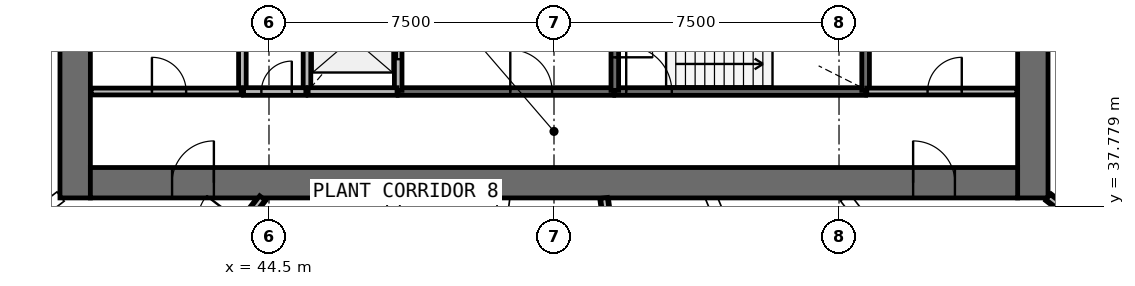
"""IFC4 building model, lengths in metres.
Left out: names, types, materials, properties, quantities, classifications, styles, units other than length and angle.
Written with IfcOpenShell. Run it as: python <this file> out.ifc"""

import sys

from ifc_helpers import new_model, si_unit, direction, frame, frame_2d, origin, place, context, subcontext, project, spatial, rectangle, extrude, source, transform, mapped, element, fill, save


model = new_model("IFC4")
c1 = context("Model", 3, precision=1e-05, world=origin(), true_north=direction((0.0, 1.0)))
c2 = subcontext(c1, "Body", "Model", "MODEL_VIEW")
j1 = project(units=[si_unit("LENGTHUNIT", "METRE"), si_unit("PLANEANGLEUNIT", "RADIAN")], contexts=[c1])
p1 = place(None, origin())
s1 = spatial("IfcSite", under=j1, at=p1, CompositionType="ELEMENT")
p2 = place(p1, origin())
s2 = spatial("IfcBuilding", under=s1, at=p2, CompositionType="ELEMENT")
p3 = place(p2, frame((0.0, 0.0, 129.0)))
s3 = spatial("IfcBuildingStorey", under=s2, at=p3, CompositionType="ELEMENT", Elevation=129.0)
p4 = place(p3, frame((64.6, 38.0, 0.0), z_axis=(0.0, 0.0, 1.0), x_axis=(0.0, 1.0, 0.0)))
e1 = element("IfcWall", 1, at=p4, inside=s3, PredefinedType="SHEAR", context=c2, shape_type="SweptSolid", body=[
    extrude(rectangle(XDim=20.0, YDim=0.8, at=frame_2d((10.0, 0.0))), origin(), (0.0, 0.0, 1.0), 4.1),
])
p5 = place(p4, frame((9.1, 0.0, 0.0)))
e2 = element("IfcOpeningElement", 2, at=p5, cuts=e1, PredefinedType="OPENING", context=c2, shape_type="SweptSolid", body=[
    extrude(rectangle(XDim=1.8, YDim=2.1, at=frame_2d((0.9, 1.05))), frame((0.0, 0.41, 0.0), z_axis=(0.0, -1.0, 0.0), x_axis=(1.0, 0.0, 0.0)), (0.0, 0.0, 1.0), 0.82),
])
p6 = place(p3, frame((39.4, 58.0, 0.0), z_axis=(0.0, 0.0, 1.0), x_axis=(0.0, -1.0, 0.0)))
e3 = element("IfcWall", 3, at=p6, inside=s3, PredefinedType="SHEAR", context=c2, shape_type="SweptSolid", body=[
    extrude(rectangle(XDim=20.0, YDim=0.8, at=frame_2d((10.0, 0.0))), origin(), (0.0, 0.0, 1.0), 4.1),
])
p7 = place(p6, frame((9.1, 0.0, 0.0)))
e4 = element("IfcOpeningElement", 4, at=p7, cuts=e3, PredefinedType="OPENING", context=c2, shape_type="SweptSolid", body=[
    extrude(rectangle(XDim=1.8, YDim=2.1, at=frame_2d((0.9, 1.05))), frame((0.0, 0.41, 0.0), z_axis=(0.0, -1.0, 0.0), x_axis=(1.0, 0.0, 0.0)), (0.0, 0.0, 1.0), 0.82),
])
p8 = place(p3, frame((39.8, 38.4, 0.0), z_axis=(0.0, 0.0, 1.0), x_axis=(1.0, 0.0, 0.0)))
e5 = element("IfcWall", 5, at=p8, inside=s3, PredefinedType="SHEAR", context=c2, shape_type="SweptSolid", body=[
    extrude(rectangle(XDim=24.4, YDim=0.8, at=frame_2d((12.2, 0.0))), origin(), (0.0, 0.0, 1.0), 4.1),
])
p9 = place(p8, frame((21.65, 0.0, 0.0)))
e6 = element("IfcOpeningElement", 6, at=p9, cuts=e5, PredefinedType="OPENING", context=c2, shape_type="SweptSolid", body=[
    extrude(rectangle(XDim=1.1, YDim=2.1, at=frame_2d((0.55, 1.05))), frame((0.0, 0.41, 0.0), z_axis=(0.0, -1.0, 0.0), x_axis=(1.0, 0.0, 0.0)), (0.0, 0.0, 1.0), 0.82),
])
p10 = place(p8, frame((2.15, 0.0, 0.0)))
e7 = element("IfcOpeningElement", 7, at=p10, cuts=e5, PredefinedType="OPENING", context=c2, shape_type="SweptSolid", body=[
    extrude(rectangle(XDim=1.1, YDim=2.1, at=frame_2d((0.55, 1.05))), frame((0.0, 0.41, 0.0), z_axis=(0.0, -1.0, 0.0), x_axis=(1.0, 0.0, 0.0)), (0.0, 0.0, 1.0), 0.82),
])
p11 = place(p3, frame((53.6, 40.8, 0.0), z_axis=(0.0, 0.0, 1.0), x_axis=(1.0, 0.0, 0.0)))
e8 = element("IfcWall", 8, at=p11, inside=s3, PredefinedType="SOLIDWALL", context=c2, shape_type="SweptSolid", body=[
    extrude(rectangle(XDim=6.6, YDim=0.2, at=frame_2d((3.3, 0.0))), origin(), (0.0, 0.0, 1.0), 3.78),
])
p12 = place(p11, frame((0.3, 0.0, 0.0)))
e9 = element("IfcOpeningElement", 9, at=p12, cuts=e8, PredefinedType="OPENING", context=c2, shape_type="SweptSolid", body=[
    extrude(rectangle(XDim=1.2, YDim=2.1, at=frame_2d((0.6, 1.05))), frame((0.0, 0.11, 0.0), z_axis=(0.0, -1.0, 0.0), x_axis=(1.0, 0.0, 0.0)), (0.0, 0.0, 1.0), 0.22),
])
p13 = place(p3, frame((47.9, 40.8, 0.0), z_axis=(0.0, 0.0, 1.0), x_axis=(1.0, 0.0, 0.0)))
e10 = element("IfcWall", 10, at=p13, inside=s3, PredefinedType="SOLIDWALL", context=c2, shape_type="SweptSolid", body=[
    extrude(rectangle(XDim=5.67, YDim=0.2, at=frame_2d((2.835, 0.0))), origin(), (0.0, 0.0, 1.0), 3.78),
])
p14 = place(p13, frame((2.95, 0.0, 0.0)))
e11 = element("IfcOpeningElement", 11, at=p14, cuts=e10, PredefinedType="OPENING", context=c2, shape_type="SweptSolid", body=[
    extrude(rectangle(XDim=1.1, YDim=2.1, at=frame_2d((0.55, 1.05))), frame((0.0, 0.11, 0.0), z_axis=(0.0, -1.0, 0.0), x_axis=(1.0, 0.0, 0.0)), (0.0, 0.0, 1.0), 0.22),
])
for number, where, z_axis, x_axis in (
    (12, (43.8, 43.6, 0.0), (0.0, 0.0, 1.0), (0.0, -1.0, 0.0)),
    (13, (45.5, 43.6, 0.0), (0.0, 0.0, 1.0), (0.0, -1.0, 0.0)),
):
    element("IfcWall", number, at=place(p3, frame(where, z_axis=z_axis, x_axis=x_axis)), inside=s3, PredefinedType="SOLIDWALL", context=c2, shape_type="SweptSolid", body=[
        extrude(rectangle(XDim=2.8, YDim=0.2, at=frame_2d((1.4, 0.0))), origin(), (0.0, 0.0, 1.0), 3.78),
    ])
p15 = place(p3, frame((47.9, 40.83, 0.0), z_axis=(0.0, 0.0, 1.0), x_axis=(0.0, 1.0, 0.0)))
e14 = element("IfcWall", 14, at=p15, inside=s3, PredefinedType="SOLIDWALL", context=c2, shape_type="SweptSolid", body=[
    extrude(rectangle(XDim=2.77, YDim=0.2, at=frame_2d((1.385, 0.0))), origin(), (0.0, 0.0, 1.0), 3.78),
])
p16 = place(p15, frame((0.82, 0.0, 0.0)))
e15 = element("IfcOpeningElement", 15, at=p16, cuts=e14, PredefinedType="OPENING", context=c2, shape_type="SweptSolid", body=[
    extrude(rectangle(XDim=1.1, YDim=2.1, at=frame_2d((0.55, 1.05))), frame((0.0, 0.11, 0.0), z_axis=(0.0, -1.0, 0.0), x_axis=(1.0, 0.0, 0.0)), (0.0, 0.0, 1.0), 0.22),
])
p17 = place(p3, frame((60.2, 40.83, 0.0), z_axis=(0.0, 0.0, 1.0), x_axis=(0.0, 1.0, 0.0)))
e16 = element("IfcWall", 16, at=p17, inside=s3, PredefinedType="SOLIDWALL", context=c2, shape_type="SweptSolid", body=[
    extrude(rectangle(XDim=2.77, YDim=0.2, at=frame_2d((1.385, 0.0))), origin(), (0.0, 0.0, 1.0), 3.78),
])
p18 = place(p3, frame((53.6, 43.6, 0.0), z_axis=(0.0, 0.0, 1.0), x_axis=(0.0, -1.0, 0.0)))
e17 = element("IfcWall", 17, at=p18, inside=s3, PredefinedType="SOLIDWALL", context=c2, shape_type="SweptSolid", body=[
    extrude(rectangle(XDim=2.77, YDim=0.2, at=frame_2d((1.385, 0.0))), origin(), (0.0, 0.0, 1.0), 3.78),
])
p19 = place(p18, frame((0.9, 0.0, 0.0)))
e18 = element("IfcOpeningElement", 18, at=p19, cuts=e17, PredefinedType="OPENING", context=c2, shape_type="SweptSolid", body=[
    extrude(rectangle(XDim=1.0, YDim=2.1, at=frame_2d((0.5, 1.05))), frame((0.0, 0.11, 0.0), z_axis=(0.0, -1.0, 0.0), x_axis=(1.0, 0.0, 0.0)), (0.0, 0.0, 1.0), 0.22),
])
p20 = place(p3, frame((45.53, 40.8, 0.0), z_axis=(0.0, 0.0, 1.0), x_axis=(1.0, 0.0, 0.0)))
e19 = element("IfcWall", 19, at=p20, inside=s3, PredefinedType="SOLIDWALL", context=c2, shape_type="SweptSolid", body=[
    extrude(rectangle(XDim=2.34, YDim=0.2, at=frame_2d((1.17, 0.0))), origin(), (0.0, 0.0, 1.0), 3.78),
])
p21 = place(p3, frame((43.83, 40.8, 0.0), z_axis=(0.0, 0.0, 1.0), x_axis=(1.0, 0.0, 0.0)))
e20 = element("IfcWall", 20, at=p21, inside=s3, PredefinedType="SOLIDWALL", context=c2, shape_type="SweptSolid", body=[
    extrude(rectangle(XDim=1.64, YDim=0.2, at=frame_2d((0.82, 0.0))), origin(), (0.0, 0.0, 1.0), 3.78),
])
p22 = place(p21, frame((0.47, 0.0, 0.0)))
e21 = element("IfcOpeningElement", 21, at=p22, cuts=e20, PredefinedType="OPENING", context=c2, shape_type="SweptSolid", body=[
    extrude(rectangle(XDim=0.8, YDim=2.1, at=frame_2d((0.4, 1.05))), frame((0.0, 0.11, 0.0), z_axis=(0.0, -1.0, 0.0), x_axis=(1.0, 0.0, 0.0)), (0.0, 0.0, 1.0), 0.22),
])
p23 = place(p3, frame((60.23, 40.8, 0.0), z_axis=(0.0, 0.0, 1.0), x_axis=(1.0, 0.0, 0.0)))
e22 = element("IfcWall", 22, at=p23, inside=s3, PredefinedType="PARTITIONING", context=c2, shape_type="SweptSolid", body=[
    extrude(rectangle(XDim=3.95, YDim=0.18, at=frame_2d((1.975, 0.0))), origin(), (0.0, 0.0, 1.0), 3.78),
])
p24 = place(p23, frame((1.6, 0.0, 0.0)))
e23 = element("IfcOpeningElement", 23, at=p24, cuts=e22, PredefinedType="OPENING", context=c2, shape_type="SweptSolid", body=[
    extrude(rectangle(XDim=0.9, YDim=2.1, at=frame_2d((0.45, 1.05))), frame((0.0, 0.1, 0.0), z_axis=(0.0, -1.0, 0.0), x_axis=(1.0, 0.0, 0.0)), (0.0, 0.0, 1.0), 0.2),
])
p25 = place(p3, frame((39.82, 40.8, 0.0), z_axis=(0.0, 0.0, 1.0), x_axis=(1.0, 0.0, 0.0)))
e24 = element("IfcWall", 24, at=p25, inside=s3, PredefinedType="PARTITIONING", context=c2, shape_type="SweptSolid", body=[
    extrude(rectangle(XDim=3.95, YDim=0.18, at=frame_2d((1.975, 0.0))), origin(), (0.0, 0.0, 1.0), 3.78),
])
p26 = place(p25, frame((1.6, 0.0, 0.0)))
e25 = element("IfcOpeningElement", 25, at=p26, cuts=e24, PredefinedType="OPENING", context=c2, shape_type="SweptSolid", body=[
    extrude(rectangle(XDim=0.9, YDim=2.1, at=frame_2d((0.45, 1.05))), frame((0.0, 0.1, 0.0), z_axis=(0.0, -1.0, 0.0), x_axis=(1.0, 0.0, 0.0)), (0.0, 0.0, 1.0), 0.2),
])
p27 = place(p3, frame((42.554, 35.69, 0.0), z_axis=(0.0, 0.0, 1.0), x_axis=(0.608737787706, 0.793371480341, 0.0)))
e26 = element("IfcWall", 26, at=p27, inside=s3, PredefinedType="PARTITIONING", context=c2, shape_type="SweptSolid", body=[
    extrude(rectangle(XDim=2.912, YDim=0.18, at=frame_2d((1.456, 0.0))), origin(), (0.0, 0.0, 1.0), 2.58),
])
p28 = place(p27, frame((0.862, 0.0, 0.0)))
e27 = element("IfcOpeningElement", 27, at=p28, cuts=e26, PredefinedType="OPENING", context=c2, shape_type="SweptSolid", body=[
    extrude(rectangle(XDim=1.2, YDim=2.1, at=frame_2d((0.6, 1.05))), frame((0.0, 0.1, 0.0), z_axis=(0.0, -1.0, 0.0), x_axis=(1.0, 0.0, 0.0)), (0.0, 0.0, 1.0), 0.2),
])
p29 = place(p3, frame((53.629, 35.63, 0.0), z_axis=(0.0, 0.0, 1.0), x_axis=(-0.13060507681, 0.991434472828, 0.0)))
e28 = element("IfcWall", 28, at=p29, inside=s3, PredefinedType="PARTITIONING", context=c2, shape_type="SweptSolid", body=[
    extrude(rectangle(XDim=2.391, YDim=0.18, at=frame_2d((1.195, 0.0))), origin(), (0.0, 0.0, 1.0), 2.58),
])
p30 = place(p29, frame((0.541, 0.0, 0.0)))
e29 = element("IfcOpeningElement", 29, at=p30, cuts=e28, PredefinedType="OPENING", context=c2, shape_type="SweptSolid", body=[
    extrude(rectangle(XDim=1.2, YDim=2.1, at=frame_2d((0.6, 1.05))), frame((0.0, 0.1, 0.0), z_axis=(0.0, -1.0, 0.0), x_axis=(1.0, 0.0, 0.0)), (0.0, 0.0, 1.0), 0.2),
])
p31 = place(p3, frame((66.832, 36.619, 0.0), z_axis=(0.0, 0.0, 1.0), x_axis=(-0.793393624489, 0.608708926023, 0.0)))
e30 = element("IfcWall", 30, at=p31, inside=s3, PredefinedType="PARTITIONING", context=c2, shape_type="SweptSolid", body=[
    extrude(rectangle(XDim=2.309, YDim=0.18, at=frame_2d((1.155, 0.0))), origin(), (0.0, 0.0, 1.0), 2.58),
])
p32 = place(p31, frame((0.459, 0.0, 0.0)))
e31 = element("IfcOpeningElement", 31, at=p32, cuts=e30, PredefinedType="OPENING", context=c2, shape_type="SweptSolid", body=[
    extrude(rectangle(XDim=1.2, YDim=2.1, at=frame_2d((0.6, 1.05))), frame((0.0, 0.1, 0.0), z_axis=(0.0, -1.0, 0.0), x_axis=(1.0, 0.0, 0.0)), (0.0, 0.0, 1.0), 0.2),
])
m1 = source(origin(), c2, "Body", "SweptSolid", [
    extrude(rectangle(XDim=1.1, YDim=2.1, at=frame_2d((0.55, 1.05))), frame((0.0, 0.025, 0.0), z_axis=(0.0, -1.0, 0.0), x_axis=(1.0, 0.0, 0.0)), (0.0, 0.0, 1.0), 0.05),
])
p33 = place(p16, origin())
e32 = element("IfcDoor", 32, at=p33, inside=s3, OperationType="DOUBLE_DOOR_SLIDING", PredefinedType="USERDEFINED", context=c2, shape_type="MappedRepresentation", body=[
    mapped(m1, transform((0.0, 0.0, 0.0), scale=1.0)),
])
fill(e15, e32)
m2 = source(origin(), c2, "Body", "SweptSolid", [
    extrude(rectangle(XDim=1.2, YDim=2.1, at=frame_2d((0.6, 1.05))), frame((0.0, 0.025, 0.0), z_axis=(0.0, -1.0, 0.0), x_axis=(1.0, 0.0, 0.0)), (0.0, 0.0, 1.0), 0.05),
])
p34 = place(p12, origin())
e33 = element("IfcDoor", 33, at=p34, inside=s3, OperationType="SINGLE_SWING_LEFT", PredefinedType="DOOR", context=c2, shape_type="MappedRepresentation", body=[
    mapped(m2, transform((0.0, 0.0, 0.0), scale=1.0)),
])
fill(e9, e33)
m3 = source(origin(), c2, "Body", "SweptSolid", [
    extrude(rectangle(XDim=1.0, YDim=2.1, at=frame_2d((0.5, 1.05))), frame((0.0, 0.025, 0.0), z_axis=(0.0, -1.0, 0.0), x_axis=(1.0, 0.0, 0.0)), (0.0, 0.0, 1.0), 0.05),
])
p35 = place(p19, origin())
e34 = element("IfcDoor", 34, at=p35, inside=s3, OperationType="SINGLE_SWING_RIGHT", PredefinedType="DOOR", context=c2, shape_type="MappedRepresentation", body=[
    mapped(m3, transform((0.0, 0.0, 0.0), scale=1.0)),
])
fill(e18, e34)
m4 = source(origin(), c2, "Body", "SweptSolid", [
    extrude(rectangle(XDim=1.1, YDim=2.1, at=frame_2d((0.55, 1.05))), frame((0.0, 0.025, 0.0), z_axis=(0.0, -1.0, 0.0), x_axis=(1.0, 0.0, 0.0)), (0.0, 0.0, 1.0), 0.05),
])
p36 = place(p14, origin())
e35 = element("IfcDoor", 35, at=p36, inside=s3, OperationType="SINGLE_SWING_LEFT", PredefinedType="DOOR", context=c2, shape_type="MappedRepresentation", body=[
    mapped(m4, transform((0.0, 0.0, 0.0), scale=1.0)),
])
fill(e11, e35)
m5 = source(origin(), c2, "Body", "SweptSolid", [
    extrude(rectangle(XDim=0.8, YDim=2.1, at=frame_2d((0.4, 1.05))), frame((0.0, 0.025, 0.0), z_axis=(0.0, -1.0, 0.0), x_axis=(1.0, 0.0, 0.0)), (0.0, 0.0, 1.0), 0.05),
])
p37 = place(p22, origin())
e36 = element("IfcDoor", 36, at=p37, inside=s3, OperationType="SINGLE_SWING_RIGHT", PredefinedType="DOOR", context=c2, shape_type="MappedRepresentation", body=[
    mapped(m5, transform((0.0, 0.0, 0.0), scale=1.0)),
])
fill(e21, e36)
m6 = source(origin(), c2, "Body", "SweptSolid", [
    extrude(rectangle(XDim=1.1, YDim=2.1, at=frame_2d((0.55, 1.05))), frame((0.0, 0.025, 0.0), z_axis=(0.0, -1.0, 0.0), x_axis=(1.0, 0.0, 0.0)), (0.0, 0.0, 1.0), 0.05),
])
p38 = place(p9, origin())
e37 = element("IfcDoor", 37, at=p38, inside=s3, OperationType="SINGLE_SWING_LEFT", PredefinedType="DOOR", context=c2, shape_type="MappedRepresentation", body=[
    mapped(m6, transform((0.0, 0.0, 0.0), scale=1.0)),
])
fill(e6, e37)
p39 = place(p10, origin())
e38 = element("IfcDoor", 38, at=p39, inside=s3, OperationType="SINGLE_SWING_RIGHT", PredefinedType="DOOR", context=c2, shape_type="MappedRepresentation", body=[
    mapped(m6, transform((0.0, 0.0, 0.0), scale=1.0)),
])
fill(e7, e38)
m7 = source(origin(), c2, "Body", "SweptSolid", [
    extrude(rectangle(XDim=0.9, YDim=2.1, at=frame_2d((0.45, 1.05))), frame((0.0, 0.025, 0.0), z_axis=(0.0, -1.0, 0.0), x_axis=(1.0, 0.0, 0.0)), (0.0, 0.0, 1.0), 0.05),
])
p40 = place(p26, origin())
e39 = element("IfcDoor", 39, at=p40, inside=s3, OperationType="SINGLE_SWING_LEFT", PredefinedType="DOOR", context=c2, shape_type="MappedRepresentation", body=[
    mapped(m7, transform((0.0, 0.0, 0.0), scale=1.0)),
])
fill(e25, e39)
p41 = place(p24, origin())
e40 = element("IfcDoor", 40, at=p41, inside=s3, OperationType="SINGLE_SWING_RIGHT", PredefinedType="DOOR", context=c2, shape_type="MappedRepresentation", body=[
    mapped(m7, transform((0.0, 0.0, 0.0), scale=1.0)),
])
fill(e23, e40)
save(model, sys.argv[1])
